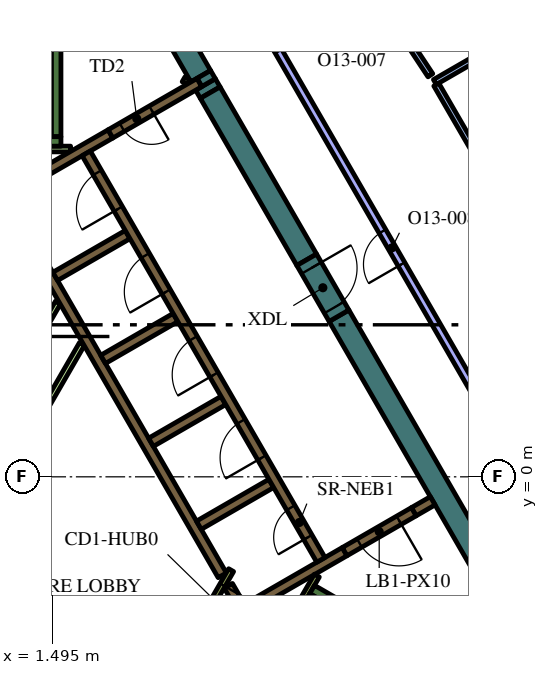
"""IFC4 building model, lengths in metres.
Left out: names, types, materials, properties, quantities, classifications, styles, units other than length and angle.
Written with IfcOpenShell. Run it as: python <this file> out.ifc"""

import sys

from ifc_helpers import new_model, si_unit, direction, frame, frame_2d, origin, place, context, subcontext, project, spatial, polyline, rectangle, outline, extrude, element, fill, save


model = new_model("IFC4")
c1 = context("Model", 3, precision=1e-05, world=origin(), true_north=direction((0.0, 1.0)))
c2 = subcontext(c1, "Body", "Model", "MODEL_VIEW")
j1 = project(units=[si_unit("LENGTHUNIT", "METRE"), si_unit("PLANEANGLEUNIT", "RADIAN")], contexts=[c1])
p1 = place(None, origin())
s1 = spatial("IfcSite", under=j1, at=p1, CompositionType="ELEMENT")
p2 = place(p1, origin())
s2 = spatial("IfcBuilding", under=s1, at=p2, CompositionType="ELEMENT")
p3 = place(p2, frame((0.0, 0.0, 296.4)))
s3 = spatial("IfcBuildingStorey", under=s2, at=p3, CompositionType="ELEMENT", Elevation=296.4)
p4 = place(p3, frame((9.042, 4.239, 0.0), z_axis=(0.0, 0.0, 1.0), x_axis=(0.500005785455, -0.866022063525, 0.0)))
e1 = element("IfcWall", 1, at=p4, inside=s3, PredefinedType="SOLIDWALL", context=c2, shape_type="SweptSolid", body=[
    extrude(rectangle(XDim=12.406, YDim=0.6, at=frame_2d((6.203, 0.0))), origin(), (0.0, 0.0, 1.0), 4.2),
])
p5 = place(p3, frame((5.529, 10.324, 0.0), z_axis=(0.0, 0.0, 1.0), x_axis=(0.499122205112, -0.866531606097, 0.0)))
e2 = element("IfcWall", 2, at=p5, inside=s3, PredefinedType="SOLIDWALL", context=c2, shape_type="SweptSolid", body=[
    extrude(rectangle(XDim=0.247, YDim=0.6, at=frame_2d((0.123, 0.0))), origin(), (0.0, 0.0, 1.0), 4.2),
])
p6 = place(p3, frame((1.989, 16.456, 0.0), z_axis=(0.0, 0.0, 1.0), x_axis=(0.499973159588, -0.866040899549, 0.0)))
e3 = element("IfcWall", 3, at=p6, inside=s3, PredefinedType="SOLIDWALL", context=c2, shape_type="SweptSolid", body=[
    extrude(rectangle(XDim=6.828, YDim=0.6, at=frame_2d((3.414, 0.0))), origin(), (0.0, 0.0, 1.0), 4.2),
])
p7 = place(p3, origin())
e4 = element("IfcWall", 4, at=p7, inside=s3, PredefinedType="SOLIDWALL", context=c2, shape_type="SweptSolid", body=[
    extrude(outline(polyline([(5.664, 10.691), (5.788, 10.476), (5.432, 10.271), (5.308, 10.486), (5.664, 10.691)])), origin(), (0.0, 0.0, 1.0), 4.2),
])
p8 = place(p3, frame((8.192, 5.711, 0.0), z_axis=(0.0, 0.0, 1.0), x_axis=(-0.500006836656, 0.866021456604, 0.0)))
e5 = element("IfcWall", 5, at=p8, inside=s3, PredefinedType="SOLIDWALL", context=c2, shape_type="SweptSolid", body=[
    extrude(rectangle(XDim=5.078, YDim=0.6, at=frame_2d((2.539, 0.0))), origin(), (0.0, 0.0, 1.0), 4.2),
])
p9 = place(p3, frame((8.334, -2.964, 0.0), z_axis=(0.0, 0.0, 1.0), x_axis=(0.866016039709, -0.500016218704, 0.0)))
e6 = element("IfcWall", 6, at=p9, inside=s3, PredefinedType="SOLIDWALL", context=c2, shape_type="SweptSolid", body=[
    extrude(rectangle(XDim=7.05, YDim=0.25, at=frame_2d((3.525, 0.0))), origin(), (0.0, 0.0, 1.0), 4.2),
])
p10 = place(p3, frame((8.168, -3.503, 0.0), z_axis=(0.0, 0.0, 1.0), x_axis=(0.49972245349, 0.866185586049, 0.0)))
e7 = element("IfcWall", 7, at=p10, inside=s3, PredefinedType="SOLIDWALL", context=c2, shape_type="SweptSolid", body=[
    extrude(rectangle(XDim=0.425, YDim=0.25, at=frame_2d((0.212, 0.0))), origin(), (0.0, 0.0, 1.0), 4.2),
])
p11 = place(p3, frame((1.6, 8.95, 0.0), z_axis=(0.0, 0.0, 1.0), x_axis=(0.0, 1.0, 0.0)))
e8 = element("IfcWall", 8, at=p11, inside=s3, PredefinedType="SOLIDWALL", context=c2, shape_type="SweptSolid", body=[
    extrude(rectangle(XDim=6.8, YDim=0.25, at=frame_2d((3.4, 0.0))), origin(), (0.0, 0.0, 1.0), 4.2),
])
p12 = place(p3, frame((1.05, 8.825, 0.0), z_axis=(0.0, 0.0, 1.0), x_axis=(1.0, 0.0, 0.0)))
e9 = element("IfcWall", 9, at=p12, inside=s3, PredefinedType="SOLIDWALL", context=c2, shape_type="SweptSolid", body=[
    extrude(rectangle(XDim=0.675, YDim=0.25, at=frame_2d((0.337, 0.0))), origin(), (0.0, 0.0, 1.0), 4.2),
])
p13 = place(p3, frame((9.19, -1.969, 0.0), z_axis=(0.0, 0.0, 1.0), x_axis=(-0.866057109641, -0.499945079824, 0.0)))
e10 = element("IfcWall", 10, at=p13, inside=s3, PredefinedType="SOLIDWALL", context=c2, shape_type="SweptSolid", body=[
    extrude(rectangle(XDim=3.291, YDim=0.25, at=frame_2d((1.646, 0.0))), origin(), (0.0, 0.0, 1.0), 4.2),
])
p14 = place(p3, frame((6.13, -2.867, 0.0), z_axis=(0.0, 0.0, 1.0), x_axis=(0.500160776593, -0.865932559475, 0.0)))
e11 = element("IfcWall", 11, at=p14, inside=s3, PredefinedType="SOLIDWALL", context=c2, shape_type="SweptSolid", body=[
    extrude(rectangle(XDim=0.627, YDim=0.25, at=frame_2d((0.313, 0.0))), origin(), (0.0, 0.0, 1.0), 4.2),
])
p15 = place(p3, frame((11.507, -0.631, 0.0), z_axis=(0.0, 0.0, 1.0), x_axis=(-0.866093731455, -0.499881634324, 0.0)))
e12 = element("IfcWall", 12, at=p15, inside=s3, PredefinedType="SOLIDWALL", context=c2, shape_type="SweptSolid", body=[
    extrude(rectangle(XDim=0.575, YDim=0.25, at=frame_2d((0.288, 0.0))), origin(), (0.0, 0.0, 1.0), 4.2),
])
p16 = place(p3, frame((3.028, 9.023, 0.0), z_axis=(0.0, 0.0, 1.0), x_axis=(-0.866036587186, -0.49998062928, 0.0)))
e13 = element("IfcWall", 13, at=p16, inside=s3, PredefinedType="SOLIDWALL", context=c2, shape_type="SweptSolid", body=[
    extrude(rectangle(XDim=3.384, YDim=0.25, at=frame_2d((1.692, 0.0))), origin(), (0.0, 0.0, 1.0), 4.2),
])
p17 = place(p3, frame((5.97, -2.591, 0.0), z_axis=(0.0, 0.0, 1.0), x_axis=(-0.499994469932, 0.866028596547, 0.0)))
e14 = element("IfcWall", 14, at=p17, inside=s3, PredefinedType="SOLIDWALL", context=c2, shape_type="SweptSolid", body=[
    extrude(rectangle(XDim=10.488, YDim=0.25, at=frame_2d((5.244, 0.0))), origin(), (0.0, 0.0, 1.0), 4.2),
])
p18 = place(p3, frame((1.574, 5.274, 0.0), z_axis=(0.0, 0.0, 1.0), x_axis=(0.866028486751, 0.499994660107, 0.0)))
e15 = element("IfcWall", 15, at=p18, inside=s3, PredefinedType="SOLIDWALL", context=c2, shape_type="SweptSolid", body=[
    extrude(rectangle(XDim=2.2, YDim=0.25, at=frame_2d((1.1, 0.0))), origin(), (0.0, 0.0, 1.0), 4.2),
])
for number, where, z_axis, x_axis in (
    (16, (2.834, 3.091, 0.0), (0.0, 0.0, 1.0), (0.866, 0.5, 0.0)),
    (17, (4.094, 0.909, 0.0), (0.0, 0.0, 1.0), (0.866, 0.5, 0.0)),
    (18, (5.354, -1.274, 0.0), (0.0, 0.0, 1.0), (0.866, 0.5, 0.0)),
):
    element("IfcWall", number, at=place(p3, frame(where, z_axis=z_axis, x_axis=x_axis)), inside=s3, PredefinedType="SOLIDWALL", context=c2, shape_type="SweptSolid", body=[
        extrude(rectangle(XDim=2.2, YDim=0.25, at=frame_2d((1.1, 0.0))), origin(), (0.0, 0.0, 1.0), 4.2),
    ])
p19 = place(p3, frame((1.05, 8.625, 0.0), z_axis=(0.0, 0.0, 1.0), x_axis=(1.0, 0.0, 0.0)))
e19 = element("IfcWall", 19, at=p19, inside=s3, PredefinedType="PARTITIONING", context=c2, shape_type="SweptSolid", body=[
    extrude(rectangle(XDim=0.929, YDim=0.15, at=frame_2d((0.464, 0.0))), origin(), (0.0, 0.0, 1.0), 3.55),
])
p20 = place(p3, frame((4.98, 10.358, 0.0), z_axis=(0.0, 0.0, 1.0), x_axis=(0.500640202437, 0.86565546709, 0.0)))
e20 = element("IfcWall", 20, at=p20, inside=s3, PredefinedType="PARTITIONING", context=c2, shape_type="SweptSolid", body=[
    extrude(rectangle(XDim=0.146, YDim=0.15, at=frame_2d((0.073, 0.0))), origin(), (0.0, 0.0, 1.0), 3.55),
])
p21 = place(p3, frame((8.459, -2.599, 0.0), z_axis=(0.0, 0.0, 1.0), x_axis=(-0.500041054325, -0.866001699761, 0.0)))
e21 = element("IfcWall", 21, at=p21, inside=s3, PredefinedType="PARTITIONING", context=c2, shape_type="SweptSolid", body=[
    extrude(rectangle(XDim=0.929, YDim=0.15, at=frame_2d((0.464, 0.0))), origin(), (0.0, 0.0, 1.0), 4.2),
])
p22 = place(p3, frame((-1.887, -3.718, 0.0), z_axis=(0.0, 0.0, 1.0), x_axis=(0.500005008002, 0.866022512394, 0.0)))
e22 = element("IfcWall", 22, at=p22, inside=s3, PredefinedType="PARTITIONING", context=c2, shape_type="SweptSolid", body=[
    extrude(rectangle(XDim=8.327, YDim=0.15, at=frame_2d((4.164, 0.0))), origin(), (0.0, 0.0, 1.0), 3.55),
])
p23 = place(p3, frame((-0.3, 1.212, 0.0), z_axis=(0.0, 0.0, 1.0), x_axis=(0.499963101113, 0.866046706318, 0.0)))
e23 = element("IfcWall", 23, at=p23, inside=s3, PredefinedType="PARTITIONING", context=c2, shape_type="SweptSolid", body=[
    extrude(rectangle(XDim=3.893, YDim=0.15, at=frame_2d((1.947, 0.0))), origin(), (0.0, 0.0, 1.0), 3.55),
])
p24 = place(p3, frame((8.565, -2.185, 0.0), z_axis=(0.0, 0.0, 1.0), x_axis=(-0.499997954832, 0.866026584559, 0.0)))
e24 = element("IfcWall", 24, at=p24, inside=s3, PredefinedType="SOLIDWALL", context=c2, shape_type="SweptSolid", body=[
    extrude(rectangle(XDim=12.35, YDim=0.25, at=frame_2d((6.175, 0.0))), origin(), (0.0, 0.0, 1.0), 4.2),
])
p25 = place(p24, frame((0.685, 0.0, 0.0)))
e25 = element("IfcOpeningElement", 25, at=p25, cuts=e24, PredefinedType="OPENING", context=c2, shape_type="SweptSolid", body=[
    extrude(rectangle(XDim=0.9, YDim=2.1, at=frame_2d((0.45, 1.05))), frame((0.0, 0.135, 0.0), z_axis=(0.0, -1.0, 0.0), x_axis=(1.0, 0.0, 0.0)), (0.0, 0.0, 1.0), 0.27),
])
p26 = place(p24, frame((3.105, 0.0, 0.0)))
e26 = element("IfcOpeningElement", 26, at=p26, cuts=e24, PredefinedType="OPENING", context=c2, shape_type="SweptSolid", body=[
    extrude(rectangle(XDim=1.1, YDim=2.1, at=frame_2d((0.55, 1.05))), frame((0.0, 0.135, 0.0), z_axis=(0.0, -1.0, 0.0), x_axis=(1.0, 0.0, 0.0)), (0.0, 0.0, 1.0), 0.27),
])
p27 = place(p24, frame((5.625, 0.0, 0.0)))
e27 = element("IfcOpeningElement", 27, at=p27, cuts=e24, PredefinedType="OPENING", context=c2, shape_type="SweptSolid", body=[
    extrude(rectangle(XDim=1.1, YDim=2.1, at=frame_2d((0.55, 1.05))), frame((0.0, 0.135, 0.0), z_axis=(0.0, -1.0, 0.0), x_axis=(1.0, 0.0, 0.0)), (0.0, 0.0, 1.0), 0.27),
])
p28 = place(p24, frame((8.145, 0.0, 0.0)))
e28 = element("IfcOpeningElement", 28, at=p28, cuts=e24, PredefinedType="OPENING", context=c2, shape_type="SweptSolid", body=[
    extrude(rectangle(XDim=1.1, YDim=2.1, at=frame_2d((0.55, 1.05))), frame((0.0, 0.135, 0.0), z_axis=(0.0, -1.0, 0.0), x_axis=(1.0, 0.0, 0.0)), (0.0, 0.0, 1.0), 0.27),
])
p29 = place(p24, frame((10.665, 0.0, 0.0)))
e29 = element("IfcOpeningElement", 29, at=p29, cuts=e24, PredefinedType="OPENING", context=c2, shape_type="SweptSolid", body=[
    extrude(rectangle(XDim=1.1, YDim=2.1, at=frame_2d((0.55, 1.05))), frame((0.0, 0.135, 0.0), z_axis=(0.0, -1.0, 0.0), x_axis=(1.0, 0.0, 0.0)), (0.0, 0.0, 1.0), 0.27),
])
p30 = place(p3, frame((5.366, 10.373, 0.0), z_axis=(0.0, 0.0, 1.0), x_axis=(-0.866019956843, -0.50000943426, 0.0)))
e30 = element("IfcWall", 30, at=p30, inside=s3, PredefinedType="SOLIDWALL", context=c2, shape_type="SweptSolid", body=[
    extrude(rectangle(XDim=2.7, YDim=0.25, at=frame_2d((1.35, 0.0))), origin(), (0.0, 0.0, 1.0), 4.2),
])
p31 = place(p30, frame((1.45, 0.0, 0.0)))
e31 = element("IfcOpeningElement", 31, at=p31, cuts=e30, PredefinedType="OPENING", context=c2, shape_type="SweptSolid", body=[
    extrude(rectangle(XDim=0.9, YDim=2.1, at=frame_2d((0.45, 1.05))), frame((0.0, 0.135, 0.0), z_axis=(0.0, -1.0, 0.0), x_axis=(1.0, 0.0, 0.0)), (0.0, 0.0, 1.0), 0.27),
])
p32 = place(p3, frame((6.203, -2.456, 0.0), z_axis=(0.0, 0.0, 1.0), x_axis=(-0.500043961785, -0.866000020948, 0.0)))
e32 = element("IfcWall", 32, at=p32, inside=s3, PredefinedType="PARTITIONING", context=c2, shape_type="SweptSolid", body=[
    extrude(rectangle(XDim=1.95, YDim=0.15, at=frame_2d((0.975, 0.0))), origin(), (0.0, 0.0, 1.0), 4.2),
])
p33 = place(p32, frame((0.45, 0.0, 0.0)))
e33 = element("IfcOpeningElement", 33, at=p33, cuts=e32, PredefinedType="OPENING", context=c2, shape_type="SweptSolid", body=[
    extrude(rectangle(XDim=0.9, YDim=2.1, at=frame_2d((0.45, 1.05))), frame((0.0, 0.085, 0.0), z_axis=(0.0, -1.0, 0.0), x_axis=(1.0, 0.0, 0.0)), (0.0, 0.0, 1.0), 0.17),
])
p34 = place(p3, frame((11.009, -0.919, 0.0), z_axis=(0.0, 0.0, 1.0), x_axis=(-0.866059744384, -0.49994051562, 0.0)))
e34 = element("IfcWall", 34, at=p34, inside=s3, PredefinedType="SOLIDWALL", context=c2, shape_type="SweptSolid", body=[
    extrude(rectangle(XDim=2.1, YDim=0.25, at=frame_2d((1.05, 0.0))), origin(), (0.0, 0.0, 1.0), 4.2),
])
p35 = place(p34, frame((0.45, 0.0, 0.0)))
e35 = element("IfcOpeningElement", 35, at=p35, cuts=e34, PredefinedType="OPENING", context=c2, shape_type="SweptSolid", body=[
    extrude(rectangle(XDim=1.2, YDim=2.1, at=frame_2d((0.6, 1.05))), frame((0.0, 0.135, 0.0), z_axis=(0.0, -1.0, 0.0), x_axis=(1.0, 0.0, 0.0)), (0.0, 0.0, 1.0), 0.27),
])
p36 = place(p3, frame((8.192, 5.711, 0.0), z_axis=(0.0, 0.0, 1.0), x_axis=(0.500062241894, -0.865989465428, 0.0)))
e36 = element("IfcWall", 36, at=p36, inside=s3, PredefinedType="SOLIDWALL", context=c2, shape_type="SweptSolid", body=[
    extrude(rectangle(XDim=1.7, YDim=0.6, at=frame_2d((0.85, 0.0))), origin(), (0.0, 0.0, 1.0), 4.2),
])
p37 = place(p36, frame((0.25, 0.0, 0.0)))
e37 = element("IfcOpeningElement", 37, at=p37, cuts=e36, PredefinedType="OPENING", context=c2, shape_type="SweptSolid", body=[
    extrude(rectangle(XDim=1.2, YDim=2.1, at=frame_2d((0.6, 1.05))), frame((0.0, 0.31, 0.0), z_axis=(0.0, -1.0, 0.0), x_axis=(1.0, 0.0, 0.0)), (0.0, 0.0, 1.0), 0.62),
])
p38 = place(p3, frame((11.564, 10.387, 0.0), z_axis=(0.0, 0.0, 1.0), x_axis=(0.86604641216, 0.499963610661, 0.0)))
e38 = element("IfcWall", 38, at=p38, inside=s3, PredefinedType="PARTITIONING", context=c2, shape_type="SweptSolid", body=[
    extrude(rectangle(XDim=3.096, YDim=0.15, at=frame_2d((1.548, 0.0))), origin(), (0.0, 0.0, 1.0), 3.55),
])
p39 = place(p3, frame((11.602, 10.322, 0.0), z_axis=(0.0, 0.0, 1.0), x_axis=(0.500961140821, -0.865469777281, 0.0)))
e39 = element("IfcWall", 39, at=p39, inside=s3, PredefinedType="PARTITIONING", context=c2, shape_type="SweptSolid", body=[
    extrude(rectangle(XDim=6.021, YDim=0.15, at=frame_2d((3.01, 0.0))), origin(), (0.0, 0.0, 1.0), 3.55),
])
p40 = place(p39, frame((2.521, 0.0, 0.0)))
e40 = element("IfcOpeningElement", 40, at=p40, cuts=e39, PredefinedType="OPENING", context=c2, shape_type="SweptSolid", body=[
    extrude(rectangle(XDim=0.9, YDim=2.1, at=frame_2d((0.45, 1.05))), frame((0.0, 0.085, 0.0), z_axis=(0.0, -1.0, 0.0), x_axis=(1.0, 0.0, 0.0)), (0.0, 0.0, 1.0), 0.17),
])
p41 = place(p3, frame((9.795, 13.068, 0.0), z_axis=(0.0, 0.0, 1.0), x_axis=(0.550767347659, -0.834658809786, 0.0)))
e41 = element("IfcWall", 41, at=p41, inside=s3, PredefinedType="PARTITIONING", context=c2, shape_type="SweptSolid", body=[
    extrude(rectangle(XDim=2.999, YDim=0.15, at=frame_2d((1.5, 0.0))), origin(), (0.0, 0.0, 1.0), 3.55),
])
p42 = place(p41, frame((1.099, 0.0, 0.0)))
e42 = element("IfcOpeningElement", 42, at=p42, cuts=e41, PredefinedType="OPENING", context=c2, shape_type="SweptSolid", body=[
    extrude(rectangle(XDim=0.9, YDim=2.1, at=frame_2d((0.45, 1.05))), frame((0.0, 0.085, 0.0), z_axis=(0.0, -1.0, 0.0), x_axis=(1.0, 0.0, 0.0)), (0.0, 0.0, 1.0), 0.17),
])
p43 = place(p3, frame((13.436, 0.829, 0.0), z_axis=(0.0, 0.0, 1.0), x_axis=(-0.49999894854, 0.866026010844, 0.0)))
e43 = element("IfcWall", 43, at=p43, inside=s3, PredefinedType="PARTITIONING", context=c2, shape_type="SweptSolid", body=[
    extrude(rectangle(XDim=12.0, YDim=0.2, at=frame_2d((6.0, 0.0))), origin(), (0.0, 0.0, 1.0), 3.55),
])
p44 = place(p43, frame((5.5, 0.0, 0.0)))
e44 = element("IfcOpeningElement", 44, at=p44, cuts=e43, PredefinedType="OPENING", context=c2, shape_type="SweptSolid", body=[
    extrude(rectangle(XDim=1.0, YDim=2.1, at=frame_2d((0.5, 1.05))), frame((0.0, 0.11, 0.0), z_axis=(0.0, -1.0, 0.0), x_axis=(1.0, 0.0, 0.0)), (0.0, 0.0, 1.0), 0.22),
])
p45 = place(p25, origin())
e45 = element("IfcDoor", 45, at=p45, inside=s3, OperationType="SINGLE_SWING_LEFT", PredefinedType="DOOR", context=c2, shape_type="SweptSolid", body=[
    extrude(rectangle(XDim=0.9, YDim=2.1, at=frame_2d((0.45, 1.05))), frame((0.0, 0.025, 0.0), z_axis=(0.0, -1.0, 0.0), x_axis=(1.0, 0.0, 0.0)), (0.0, 0.0, 1.0), 0.05),
])
fill(e25, e45)
p46 = place(p26, origin())
e46 = element("IfcDoor", 46, at=p46, inside=s3, OperationType="DOUBLE_DOOR_SLIDING", PredefinedType="DOOR", context=c2, shape_type="SweptSolid", body=[
    extrude(rectangle(XDim=1.1, YDim=2.1, at=frame_2d((0.55, 1.05))), frame((0.0, 0.025, 0.0), z_axis=(0.0, -1.0, 0.0), x_axis=(1.0, 0.0, 0.0)), (0.0, 0.0, 1.0), 0.05),
])
fill(e26, e46)
p47 = place(p27, origin())
e47 = element("IfcDoor", 47, at=p47, inside=s3, OperationType="DOUBLE_DOOR_SLIDING", PredefinedType="DOOR", context=c2, shape_type="SweptSolid", body=[
    extrude(rectangle(XDim=1.1, YDim=2.1, at=frame_2d((0.55, 1.05))), frame((0.0, 0.025, 0.0), z_axis=(0.0, -1.0, 0.0), x_axis=(1.0, 0.0, 0.0)), (0.0, 0.0, 1.0), 0.05),
])
fill(e27, e47)
p48 = place(p28, origin())
e48 = element("IfcDoor", 48, at=p48, inside=s3, OperationType="DOUBLE_DOOR_SLIDING", PredefinedType="DOOR", context=c2, shape_type="SweptSolid", body=[
    extrude(rectangle(XDim=1.1, YDim=2.1, at=frame_2d((0.55, 1.05))), frame((0.0, 0.025, 0.0), z_axis=(0.0, -1.0, 0.0), x_axis=(1.0, 0.0, 0.0)), (0.0, 0.0, 1.0), 0.05),
])
fill(e28, e48)
p49 = place(p29, origin())
e49 = element("IfcDoor", 49, at=p49, inside=s3, OperationType="DOUBLE_DOOR_SLIDING", PredefinedType="DOOR", context=c2, shape_type="SweptSolid", body=[
    extrude(rectangle(XDim=1.1, YDim=2.1, at=frame_2d((0.55, 1.05))), frame((0.0, 0.025, 0.0), z_axis=(0.0, -1.0, 0.0), x_axis=(1.0, 0.0, 0.0)), (0.0, 0.0, 1.0), 0.05),
])
fill(e29, e49)
p50 = place(p31, origin())
e50 = element("IfcDoor", 50, at=p50, inside=s3, OperationType="SINGLE_SWING_LEFT", PredefinedType="DOOR", context=c2, shape_type="SweptSolid", body=[
    extrude(rectangle(XDim=0.9, YDim=2.1, at=frame_2d((0.45, 1.05))), frame((0.0, 0.025, 0.0), z_axis=(0.0, -1.0, 0.0), x_axis=(1.0, 0.0, 0.0)), (0.0, 0.0, 1.0), 0.05),
])
fill(e31, e50)
p51 = place(p33, origin())
e51 = element("IfcDoor", 51, at=p51, inside=s3, OperationType="SINGLE_SWING_LEFT", PredefinedType="DOOR", context=c2, shape_type="SweptSolid", body=[
    extrude(rectangle(XDim=0.9, YDim=2.1, at=frame_2d((0.45, 1.05))), frame((0.0, 0.025, 0.0), z_axis=(0.0, -1.0, 0.0), x_axis=(1.0, 0.0, 0.0)), (0.0, 0.0, 1.0), 0.05),
])
fill(e33, e51)
p52 = place(p35, origin())
e52 = element("IfcDoor", 52, at=p52, inside=s3, OperationType="SINGLE_SWING_LEFT", PredefinedType="DOOR", context=c2, shape_type="SweptSolid", body=[
    extrude(rectangle(XDim=1.2, YDim=2.1, at=frame_2d((0.6, 1.05))), frame((0.0, 0.025, 0.0), z_axis=(0.0, -1.0, 0.0), x_axis=(1.0, 0.0, 0.0)), (0.0, 0.0, 1.0), 0.05),
])
fill(e35, e52)
p53 = place(p37, origin())
e53 = element("IfcDoor", 53, at=p53, inside=s3, OperationType="SINGLE_SWING_LEFT", PredefinedType="DOOR", context=c2, shape_type="SweptSolid", body=[
    extrude(rectangle(XDim=1.2, YDim=2.1, at=frame_2d((0.6, 1.05))), frame((0.0, 0.025, 0.0), z_axis=(0.0, -1.0, 0.0), x_axis=(1.0, 0.0, 0.0)), (0.0, 0.0, 1.0), 0.05),
])
fill(e37, e53)
p54 = place(p44, origin())
e54 = element("IfcDoor", 54, at=p54, inside=s3, OperationType="SINGLE_SWING_RIGHT", PredefinedType="DOOR", context=c2, shape_type="SweptSolid", body=[
    extrude(rectangle(XDim=1.0, YDim=2.1, at=frame_2d((0.5, 1.05))), frame((0.0, 0.025, 0.0), z_axis=(0.0, -1.0, 0.0), x_axis=(1.0, 0.0, 0.0)), (0.0, 0.0, 1.0), 0.05),
])
fill(e44, e54)
save(model, sys.argv[1])
